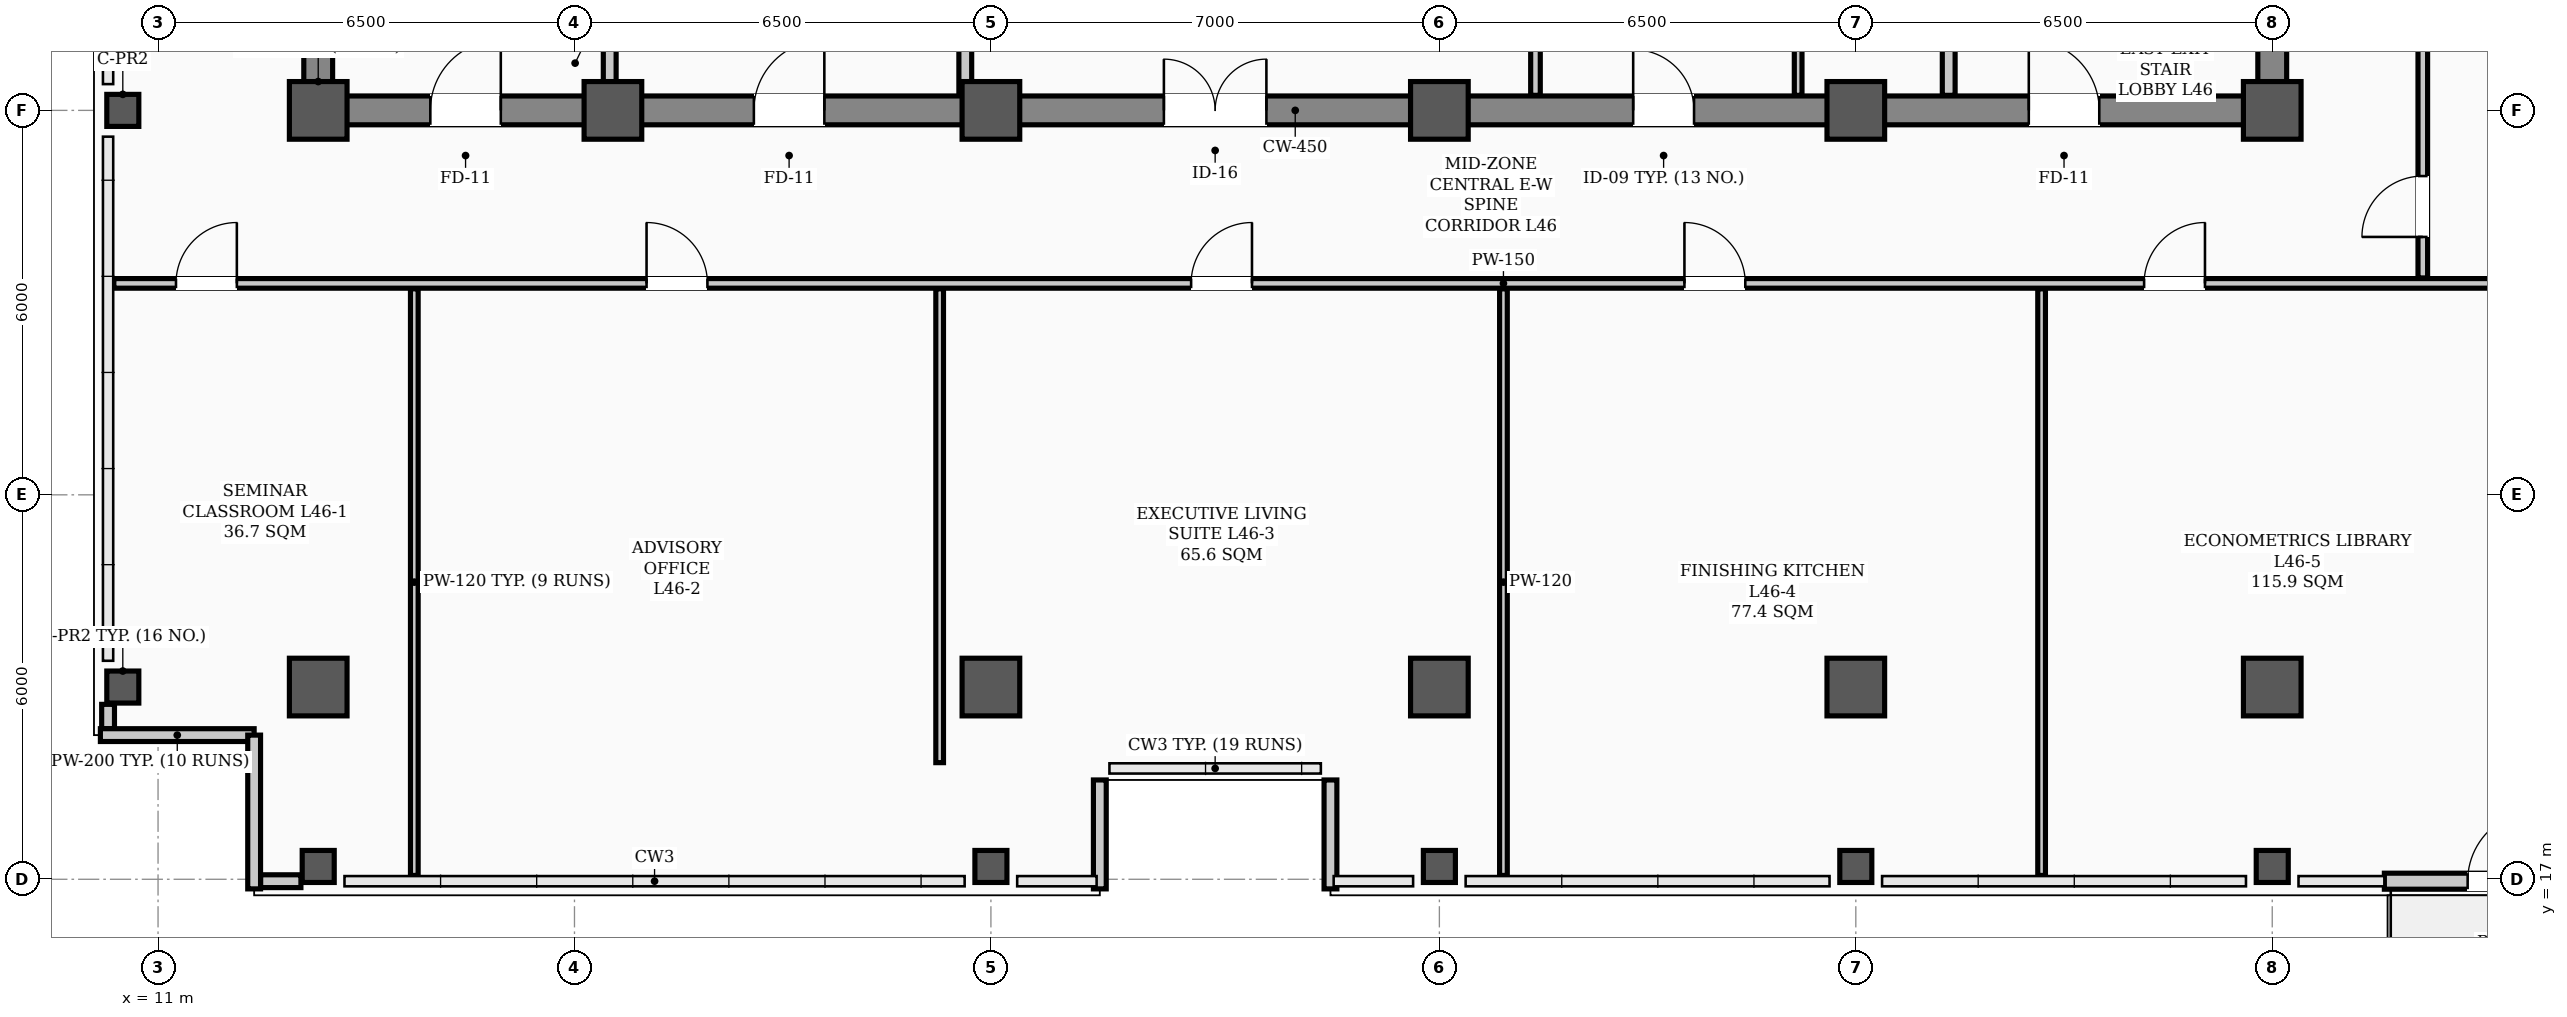
"""IFC4 building model, lengths in metres.
Left out: names, types, materials, properties, quantities, classifications, styles, units other than length and angle.
Written with IfcOpenShell. Run it as: python <this file> out.ifc"""

import sys

from ifc_helpers import new_model, si_unit, direction, frame, frame_2d, origin, origin_2d, place, context, subcontext, project, spatial, rectangle, hollow_rectangle, extrude, element, fill, save


model = new_model("IFC4")
c1 = context("Model", 3, precision=1e-05, world=origin(), true_north=direction((0.0, 1.0)))
c2 = subcontext(c1, "Body", "Model", "MODEL_VIEW")
j1 = project(units=[si_unit("LENGTHUNIT", "METRE"), si_unit("PLANEANGLEUNIT", "RADIAN")], contexts=[c1])
p1 = place(None, origin())
s1 = spatial("IfcSite", under=j1, at=p1, CompositionType="ELEMENT")
p2 = place(p1, origin())
s2 = spatial("IfcBuilding", under=s1, at=p2, CompositionType="ELEMENT")
p3 = place(p2, frame((0.0, 0.0, 185.1)))
s3 = spatial("IfcBuildingStorey", under=s2, at=p3, CompositionType="ELEMENT", Elevation=185.1)
for number, where, z_axis, x_axis in (
    (1, (13.5, 29.0, 0.0), (0.0, 0.0, 1.0), (1.0, 0.0, 0.0)),
    (2, (18.1, 29.0, 0.0), (0.0, 0.0, 1.0), (1.0, 0.0, 0.0)),
    (3, (24.0, 29.0, 0.0), (0.0, 0.0, 1.0), (1.0, 0.0, 0.0)),
    (4, (31.0, 29.0, 0.0), (0.0, 0.0, 1.0), (1.0, 0.0, 0.0)),
    (5, (37.5, 29.0, 0.0), (0.0, 0.0, 1.0), (1.0, 0.0, 0.0)),
    (6, (44.0, 29.0, 0.0), (0.0, 0.0, 1.0), (1.0, 0.0, 0.0)),
    (7, (13.5, 20.0, 0.0), (0.0, 0.0, 1.0), (1.0, 0.0, 0.0)),
    (8, (24.0, 20.0, 0.0), (0.0, 0.0, 1.0), (1.0, 0.0, 0.0)),
    (9, (31.0, 20.0, 0.0), (0.0, 0.0, 1.0), (1.0, 0.0, 0.0)),
    (10, (37.5, 20.0, 0.0), (0.0, 0.0, 1.0), (1.0, 0.0, 0.0)),
    (11, (44.0, 20.0, 0.0), (0.0, 0.0, 1.0), (1.0, 0.0, 0.0)),
):
    element("IfcColumn", number, at=place(p3, frame(where, z_axis=z_axis, x_axis=x_axis)), inside=s3, PredefinedType="COLUMN", context=c2, shape_type="SweptSolid", body=[
        extrude(hollow_rectangle(XDim=0.9, YDim=0.9, WallThickness=0.035, InnerFilletRadius=0.017, OuterFilletRadius=0.052, at=origin_2d()), origin(), (0.0, 0.0, 1.0), 3.9),
    ])
for number, where, z_axis, x_axis in (
    (12, (10.45, 20.0, 0.0), (0.0, 0.0, 1.0), (1.0, 0.0, 0.0)),
    (13, (10.45, 29.0, 0.0), (0.0, 0.0, 1.0), (1.0, 0.0, 0.0)),
    (14, (13.5, 17.2, 0.0), (0.0, 0.0, 1.0), (1.0, 0.0, 0.0)),
    (15, (24.0, 17.2, 0.0), (0.0, 0.0, 1.0), (1.0, 0.0, 0.0)),
    (16, (31.0, 17.2, 0.0), (0.0, 0.0, 1.0), (1.0, 0.0, 0.0)),
    (17, (37.5, 17.2, 0.0), (0.0, 0.0, 1.0), (1.0, 0.0, 0.0)),
    (18, (44.0, 17.2, 0.0), (0.0, 0.0, 1.0), (1.0, 0.0, 0.0)),
):
    element("IfcColumn", number, at=place(p3, frame(where, z_axis=z_axis, x_axis=x_axis)), inside=s3, PredefinedType="COLUMN", context=c2, shape_type="SweptSolid", body=[
        extrude(hollow_rectangle(XDim=0.5, YDim=0.5, WallThickness=0.024, InnerFilletRadius=0.012, OuterFilletRadius=0.036, at=origin_2d()), origin(), (0.0, 0.0, 1.0), 3.9),
    ])
p4 = place(p3, frame((10.22, 19.35, 0.0), z_axis=(0.0, 0.0, 1.0), x_axis=(0.0, 1.0, 0.0)))
e19 = element("IfcWall", 19, at=p4, inside=s3, PredefinedType="PARAPET", context=c2, shape_type="SweptSolid", body=[
    extrude(rectangle(XDim=0.38, YDim=0.2, at=frame_2d((0.19, 0.0))), origin(), (0.0, 0.0, 1.0), 1.2),
])
p5 = place(p3, frame((12.6, 16.97, 0.0), z_axis=(0.0, 0.0, 1.0), x_axis=(1.0, 0.0, 0.0)))
e20 = element("IfcWall", 20, at=p5, inside=s3, PredefinedType="PARAPET", context=c2, shape_type="SweptSolid", body=[
    extrude(rectangle(XDim=0.63, YDim=0.2, at=frame_2d((0.315, 0.0))), origin(), (0.0, 0.0, 1.0), 1.2),
])
for number, where, z_axis, x_axis in (
    (21, (10.1, 19.25, 0.0), (0.0, 0.0, 1.0), (1.0, 0.0, 0.0)),
    (22, (12.5, 19.25, 0.0), (0.0, 0.0, 1.0), (0.0, -1.0, 0.0)),
):
    element("IfcWall", number, at=place(p3, frame(where, z_axis=z_axis, x_axis=x_axis)), inside=s3, PredefinedType="PARAPET", context=c2, shape_type="SweptSolid", body=[
        extrude(rectangle(XDim=2.4, YDim=0.2, at=frame_2d((1.2, 0.0))), origin(), (0.0, 0.0, 1.0), 1.2),
    ])
for number, where, z_axis, x_axis in (
    (23, (25.7, 16.85, 0.0), (0.0, 0.0, 1.0), (0.0, 1.0, 0.0)),
    (24, (29.3, 18.55, 0.0), (0.0, 0.0, 1.0), (0.0, -1.0, 0.0)),
):
    element("IfcWall", number, at=place(p3, frame(where, z_axis=z_axis, x_axis=x_axis)), inside=s3, PredefinedType="PARAPET", context=c2, shape_type="SweptSolid", body=[
        extrude(rectangle(XDim=1.7, YDim=0.2, at=frame_2d((0.85, 0.0))), origin(), (0.0, 0.0, 1.0), 1.2),
    ])
p6 = place(p3, frame((45.75, 16.97, 0.0), z_axis=(0.0, 0.0, 1.0), x_axis=(1.0, 0.0, 0.0)))
e25 = element("IfcWall", 25, at=p6, inside=s3, PredefinedType="STANDARD", context=c2, shape_type="SweptSolid", body=[
    extrude(rectangle(XDim=3.7, YDim=0.25, at=frame_2d((1.85, 0.0))), origin(), (0.0, 0.0, 1.0), 3.18),
])
p7 = place(p6, frame((1.3, 0.0, 0.0)))
e26 = element("IfcOpeningElement", 26, at=p7, cuts=e25, PredefinedType="OPENING", context=c2, shape_type="SweptSolid", body=[
    extrude(rectangle(XDim=1.1, YDim=2.2, at=frame_2d((0.55, 1.1))), frame((0.0, 0.135, 0.0), z_axis=(0.0, -1.0, 0.0), x_axis=(1.0, 0.0, 0.0)), (0.0, 0.0, 1.0), 0.27),
])
p8 = place(p3, frame((13.5, 29.0, 0.0), z_axis=(0.0, 0.0, 1.0), x_axis=(1.0, 0.0, 0.0)))
e27 = element("IfcWall", 27, at=p8, inside=s3, PredefinedType="SHEAR", context=c2, shape_type="SweptSolid", body=[
    extrude(rectangle(XDim=30.5, YDim=0.45, at=frame_2d((15.25, 0.0))), origin(), (0.0, 0.0, 1.0), 3.72),
])
p9 = place(p8, frame((1.75, 0.0, 0.0)))
e28 = element("IfcOpeningElement", 28, at=p9, cuts=e27, PredefinedType="OPENING", context=c2, shape_type="SweptSolid", body=[
    extrude(rectangle(XDim=1.1, YDim=2.08, at=frame_2d((0.55, 1.04))), frame((0.0, 0.235, 0.0), z_axis=(0.0, -1.0, 0.0), x_axis=(1.0, 0.0, 0.0)), (0.0, 0.0, 1.0), 0.47),
])
p10 = place(p8, frame((26.7, 0.0, 0.0)))
e29 = element("IfcOpeningElement", 29, at=p10, cuts=e27, PredefinedType="OPENING", context=c2, shape_type="SweptSolid", body=[
    extrude(rectangle(XDim=1.1, YDim=2.08, at=frame_2d((0.55, 1.04))), frame((0.0, 0.235, 0.0), z_axis=(0.0, -1.0, 0.0), x_axis=(1.0, 0.0, 0.0)), (0.0, 0.0, 1.0), 0.47),
])
p11 = place(p8, frame((6.8, 0.0, 0.0)))
e30 = element("IfcOpeningElement", 30, at=p11, cuts=e27, PredefinedType="OPENING", context=c2, shape_type="SweptSolid", body=[
    extrude(rectangle(XDim=1.1, YDim=2.08, at=frame_2d((0.55, 1.04))), frame((0.0, 0.235, 0.0), z_axis=(0.0, -1.0, 0.0), x_axis=(1.0, 0.0, 0.0)), (0.0, 0.0, 1.0), 0.47),
])
p12 = place(p8, frame((13.2, 0.0, 0.0)))
e31 = element("IfcOpeningElement", 31, at=p12, cuts=e27, PredefinedType="OPENING", context=c2, shape_type="SweptSolid", body=[
    extrude(rectangle(XDim=1.6, YDim=2.08, at=frame_2d((0.8, 1.04))), frame((0.0, 0.235, 0.0), z_axis=(0.0, -1.0, 0.0), x_axis=(1.0, 0.0, 0.0)), (0.0, 0.0, 1.0), 0.47),
])
p13 = place(p8, frame((20.525, 0.0, 0.0)))
e32 = element("IfcOpeningElement", 32, at=p13, cuts=e27, PredefinedType="OPENING", context=c2, shape_type="SweptSolid", body=[
    extrude(rectangle(XDim=0.95, YDim=2.08, at=frame_2d((0.475, 1.04))), frame((0.0, 0.235, 0.0), z_axis=(0.0, -1.0, 0.0), x_axis=(1.0, 0.0, 0.0)), (0.0, 0.0, 1.0), 0.47),
])
for number, where, z_axis, x_axis in (
    (33, (13.5, 29.35, 0.0), (0.0, 0.0, 1.0), (0.0, 1.0, 0.0)),
    (34, (44.0, 29.35, 0.0), (0.0, 0.0, 1.0), (0.0, 1.0, 0.0)),
):
    element("IfcWall", number, at=place(p3, frame(where, z_axis=z_axis, x_axis=x_axis)), inside=s3, PredefinedType="SHEAR", context=c2, shape_type="SweptSolid", body=[
        extrude(rectangle(XDim=8.6, YDim=0.45, at=frame_2d((4.3, 0.0))), origin(), (0.0, 0.0, 1.0), 3.72),
    ])
p14 = place(p3, frame((10.31, 26.3, 0.0), z_axis=(0.0, 0.0, 1.0), x_axis=(1.0, 0.0, 0.0)))
e35 = element("IfcWall", 35, at=p14, inside=s3, PredefinedType="PARTITIONING", context=c2, shape_type="SweptSolid", body=[
    extrude(rectangle(XDim=43.38, YDim=0.15, at=frame_2d((21.69, 0.0))), origin(), (0.0, 0.0, 1.0), 3.2),
])
p15 = place(p14, frame((0.97, 0.0, 0.0)))
e36 = element("IfcOpeningElement", 36, at=p15, cuts=e35, PredefinedType="OPENING", context=c2, shape_type="SweptSolid", body=[
    extrude(rectangle(XDim=0.95, YDim=2.08, at=frame_2d((0.475, 1.04))), frame((0.0, 0.085, 0.0), z_axis=(0.0, -1.0, 0.0), x_axis=(1.0, 0.0, 0.0)), (0.0, 0.0, 1.0), 0.17),
])
p16 = place(p14, frame((8.315, 0.0, 0.0)))
e37 = element("IfcOpeningElement", 37, at=p16, cuts=e35, PredefinedType="OPENING", context=c2, shape_type="SweptSolid", body=[
    extrude(rectangle(XDim=0.95, YDim=2.08, at=frame_2d((0.475, 1.04))), frame((0.0, 0.085, 0.0), z_axis=(0.0, -1.0, 0.0), x_axis=(1.0, 0.0, 0.0)), (0.0, 0.0, 1.0), 0.17),
])
p17 = place(p14, frame((16.815, 0.0, 0.0)))
e38 = element("IfcOpeningElement", 38, at=p17, cuts=e35, PredefinedType="OPENING", context=c2, shape_type="SweptSolid", body=[
    extrude(rectangle(XDim=0.95, YDim=2.08, at=frame_2d((0.475, 1.04))), frame((0.0, 0.085, 0.0), z_axis=(0.0, -1.0, 0.0), x_axis=(1.0, 0.0, 0.0)), (0.0, 0.0, 1.0), 0.17),
])
p18 = place(p14, frame((24.515, 0.0, 0.0)))
e39 = element("IfcOpeningElement", 39, at=p18, cuts=e35, PredefinedType="OPENING", context=c2, shape_type="SweptSolid", body=[
    extrude(rectangle(XDim=0.95, YDim=2.08, at=frame_2d((0.475, 1.04))), frame((0.0, 0.085, 0.0), z_axis=(0.0, -1.0, 0.0), x_axis=(1.0, 0.0, 0.0)), (0.0, 0.0, 1.0), 0.17),
])
p19 = place(p14, frame((31.69, 0.0, 0.0)))
e40 = element("IfcOpeningElement", 40, at=p19, cuts=e35, PredefinedType="OPENING", context=c2, shape_type="SweptSolid", body=[
    extrude(rectangle(XDim=0.95, YDim=2.08, at=frame_2d((0.475, 1.04))), frame((0.0, 0.085, 0.0), z_axis=(0.0, -1.0, 0.0), x_axis=(1.0, 0.0, 0.0)), (0.0, 0.0, 1.0), 0.17),
])
for number, where, z_axis, x_axis in (
    (41, (18.05, 29.235, 0.0), (0.0, 0.0, 1.0), (0.0, 1.0, 0.0)),
    (42, (38.95, 29.235, 0.0), (0.0, 0.0, 1.0), (0.0, 1.0, 0.0)),
):
    element("IfcWall", number, at=place(p3, frame(where, z_axis=z_axis, x_axis=x_axis)), inside=s3, PredefinedType="STANDARD", context=c2, shape_type="SweptSolid", body=[
        extrude(rectangle(XDim=1.065, YDim=0.2, at=frame_2d((0.532, 0.0))), origin(), (0.0, 0.0, 1.0), 3.35),
    ])
p20 = place(p3, frame((23.6, 29.235, 0.0), z_axis=(0.0, 0.0, 1.0), x_axis=(0.0, 1.0, 0.0)))
e43 = element("IfcWall", 43, at=p20, inside=s3, PredefinedType="STANDARD", context=c2, shape_type="SweptSolid", body=[
    extrude(rectangle(XDim=5.465, YDim=0.2, at=frame_2d((2.732, 0.0))), origin(), (0.0, 0.0, 1.0), 3.2),
])
p21 = place(p3, frame((32.5, 29.235, 0.0), z_axis=(0.0, 0.0, 1.0), x_axis=(0.0, 1.0, 0.0)))
e44 = element("IfcWall", 44, at=p21, inside=s3, PredefinedType="PARTITIONING", context=c2, shape_type="SweptSolid", body=[
    extrude(rectangle(XDim=2.53, YDim=0.15, at=frame_2d((1.265, 0.0))), origin(), (0.0, 0.0, 1.0), 3.35),
])
p22 = place(p3, frame((36.6, 29.235, 0.0), z_axis=(0.0, 0.0, 1.0), x_axis=(0.0, 1.0, 0.0)))
e45 = element("IfcWall", 45, at=p22, inside=s3, PredefinedType="PARTITIONING", context=c2, shape_type="SweptSolid", body=[
    extrude(rectangle(XDim=2.53, YDim=0.12, at=frame_2d((1.265, 0.0))), origin(), (0.0, 0.0, 1.0), 3.35),
])
p23 = place(p3, frame((46.35, 26.385, 0.0), z_axis=(0.0, 0.0, 1.0), x_axis=(0.0, 1.0, 0.0)))
e46 = element("IfcWall", 46, at=p23, inside=s3, PredefinedType="PARTITIONING", context=c2, shape_type="SweptSolid", body=[
    extrude(rectangle(XDim=13.58, YDim=0.15, at=frame_2d((6.79, 0.0))), origin(), (0.0, 0.0, 1.0), 3.1),
])
p24 = place(p23, frame((0.64, 0.0, 0.0)))
e47 = element("IfcOpeningElement", 47, at=p24, cuts=e46, PredefinedType="OPENING", context=c2, shape_type="SweptSolid", body=[
    extrude(rectangle(XDim=0.95, YDim=2.08, at=frame_2d((0.475, 1.04))), frame((0.0, 0.085, 0.0), z_axis=(0.0, -1.0, 0.0), x_axis=(1.0, 0.0, 0.0)), (0.0, 0.0, 1.0), 0.17),
])
p25 = place(p23, frame((9.665, 0.0, 0.0)))
e48 = element("IfcOpeningElement", 48, at=p25, cuts=e46, PredefinedType="OPENING", context=c2, shape_type="SweptSolid", body=[
    extrude(rectangle(XDim=0.95, YDim=2.08, at=frame_2d((0.475, 1.04))), frame((0.0, 0.085, 0.0), z_axis=(0.0, -1.0, 0.0), x_axis=(1.0, 0.0, 0.0)), (0.0, 0.0, 1.0), 0.17),
])
p26 = place(p3, frame((15.0, 17.06, 0.0), z_axis=(0.0, 0.0, 1.0), x_axis=(0.0, 1.0, 0.0)))
e49 = element("IfcWall", 49, at=p26, inside=s3, PredefinedType="PARTITIONING", context=c2, shape_type="SweptSolid", body=[
    extrude(rectangle(XDim=9.155, YDim=0.12, at=frame_2d((4.578, 0.0))), origin(), (0.0, 0.0, 1.0), 3.1),
])
p27 = place(p3, frame((23.2, 18.82, 0.0), z_axis=(0.0, 0.0, 1.0), x_axis=(0.0, 1.0, 0.0)))
e50 = element("IfcWall", 50, at=p27, inside=s3, PredefinedType="PARTITIONING", context=c2, shape_type="SweptSolid", body=[
    extrude(rectangle(XDim=7.395, YDim=0.12, at=frame_2d((3.698, 0.0))), origin(), (0.0, 0.0, 1.0), 3.1),
])
for number, where, z_axis, x_axis in (
    (51, (32.0, 17.06, 0.0), (0.0, 0.0, 1.0), (0.0, 1.0, 0.0)),
    (52, (40.4, 17.06, 0.0), (0.0, 0.0, 1.0), (0.0, 1.0, 0.0)),
):
    element("IfcWall", number, at=place(p3, frame(where, z_axis=z_axis, x_axis=x_axis)), inside=s3, PredefinedType="PARTITIONING", context=c2, shape_type="SweptSolid", body=[
        extrude(rectangle(XDim=9.155, YDim=0.12, at=frame_2d((4.578, 0.0))), origin(), (0.0, 0.0, 1.0), 3.1),
    ])
p28 = place(p7, origin())
e53 = element("IfcDoor", 53, at=p28, inside=s3, OperationType="SINGLE_SWING_RIGHT", PredefinedType="DOOR", context=c2, shape_type="SweptSolid", body=[
    extrude(rectangle(XDim=1.1, YDim=2.2, at=frame_2d((0.55, 1.1))), frame((0.0, 0.025, 0.0), z_axis=(0.0, -1.0, 0.0), x_axis=(1.0, 0.0, 0.0)), (0.0, 0.0, 1.0), 0.05),
])
fill(e26, e53)
p29 = place(p9, origin())
e54 = element("IfcDoor", 54, at=p29, inside=s3, OperationType="SINGLE_SWING_RIGHT", PredefinedType="DOOR", context=c2, shape_type="SweptSolid", body=[
    extrude(rectangle(XDim=1.1, YDim=2.08, at=frame_2d((0.55, 1.04))), frame((0.0, 0.025, 0.0), z_axis=(0.0, -1.0, 0.0), x_axis=(1.0, 0.0, 0.0)), (0.0, 0.0, 1.0), 0.05),
])
fill(e28, e54)
p30 = place(p10, origin())
e55 = element("IfcDoor", 55, at=p30, inside=s3, OperationType="SINGLE_SWING_LEFT", PredefinedType="DOOR", context=c2, shape_type="SweptSolid", body=[
    extrude(rectangle(XDim=1.1, YDim=2.08, at=frame_2d((0.55, 1.04))), frame((0.0, 0.025, 0.0), z_axis=(0.0, -1.0, 0.0), x_axis=(1.0, 0.0, 0.0)), (0.0, 0.0, 1.0), 0.05),
])
fill(e29, e55)
p31 = place(p11, origin())
e56 = element("IfcDoor", 56, at=p31, inside=s3, OperationType="SINGLE_SWING_RIGHT", PredefinedType="DOOR", context=c2, shape_type="SweptSolid", body=[
    extrude(rectangle(XDim=1.1, YDim=2.08, at=frame_2d((0.55, 1.04))), frame((0.0, 0.025, 0.0), z_axis=(0.0, -1.0, 0.0), x_axis=(1.0, 0.0, 0.0)), (0.0, 0.0, 1.0), 0.05),
])
fill(e30, e56)
p32 = place(p12, origin())
e57 = element("IfcDoor", 57, at=p32, inside=s3, OperationType="DOUBLE_DOOR_SINGLE_SWING", PredefinedType="DOOR", context=c2, shape_type="SweptSolid", body=[
    extrude(rectangle(XDim=1.6, YDim=2.08, at=frame_2d((0.8, 1.04))), frame((0.0, 0.025, 0.0), z_axis=(0.0, -1.0, 0.0), x_axis=(1.0, 0.0, 0.0)), (0.0, 0.0, 1.0), 0.05),
])
fill(e31, e57)
p33 = place(p13, origin())
e58 = element("IfcDoor", 58, at=p33, inside=s3, OperationType="SINGLE_SWING_LEFT", PredefinedType="DOOR", context=c2, shape_type="SweptSolid", body=[
    extrude(rectangle(XDim=0.95, YDim=2.08, at=frame_2d((0.475, 1.04))), frame((0.0, 0.025, 0.0), z_axis=(0.0, -1.0, 0.0), x_axis=(1.0, 0.0, 0.0)), (0.0, 0.0, 1.0), 0.05),
])
fill(e32, e58)
p34 = place(p15, origin())
e59 = element("IfcDoor", 59, at=p34, inside=s3, OperationType="SINGLE_SWING_RIGHT", PredefinedType="DOOR", context=c2, shape_type="SweptSolid", body=[
    extrude(rectangle(XDim=0.95, YDim=2.08, at=frame_2d((0.475, 1.04))), frame((0.0, 0.025, 0.0), z_axis=(0.0, -1.0, 0.0), x_axis=(1.0, 0.0, 0.0)), (0.0, 0.0, 1.0), 0.05),
])
fill(e36, e59)
p35 = place(p16, origin())
e60 = element("IfcDoor", 60, at=p35, inside=s3, OperationType="SINGLE_SWING_LEFT", PredefinedType="DOOR", context=c2, shape_type="SweptSolid", body=[
    extrude(rectangle(XDim=0.95, YDim=2.08, at=frame_2d((0.475, 1.04))), frame((0.0, 0.025, 0.0), z_axis=(0.0, -1.0, 0.0), x_axis=(1.0, 0.0, 0.0)), (0.0, 0.0, 1.0), 0.05),
])
fill(e37, e60)
p36 = place(p17, origin())
e61 = element("IfcDoor", 61, at=p36, inside=s3, OperationType="SINGLE_SWING_RIGHT", PredefinedType="DOOR", context=c2, shape_type="SweptSolid", body=[
    extrude(rectangle(XDim=0.95, YDim=2.08, at=frame_2d((0.475, 1.04))), frame((0.0, 0.025, 0.0), z_axis=(0.0, -1.0, 0.0), x_axis=(1.0, 0.0, 0.0)), (0.0, 0.0, 1.0), 0.05),
])
fill(e38, e61)
p37 = place(p18, origin())
e62 = element("IfcDoor", 62, at=p37, inside=s3, OperationType="SINGLE_SWING_LEFT", PredefinedType="DOOR", context=c2, shape_type="SweptSolid", body=[
    extrude(rectangle(XDim=0.95, YDim=2.08, at=frame_2d((0.475, 1.04))), frame((0.0, 0.025, 0.0), z_axis=(0.0, -1.0, 0.0), x_axis=(1.0, 0.0, 0.0)), (0.0, 0.0, 1.0), 0.05),
])
fill(e39, e62)
p38 = place(p19, origin())
e63 = element("IfcDoor", 63, at=p38, inside=s3, OperationType="SINGLE_SWING_RIGHT", PredefinedType="DOOR", context=c2, shape_type="SweptSolid", body=[
    extrude(rectangle(XDim=0.95, YDim=2.08, at=frame_2d((0.475, 1.04))), frame((0.0, 0.025, 0.0), z_axis=(0.0, -1.0, 0.0), x_axis=(1.0, 0.0, 0.0)), (0.0, 0.0, 1.0), 0.05),
])
fill(e40, e63)
p39 = place(p24, origin())
e64 = element("IfcDoor", 64, at=p39, inside=s3, OperationType="SINGLE_SWING_LEFT", PredefinedType="DOOR", context=c2, shape_type="SweptSolid", body=[
    extrude(rectangle(XDim=0.95, YDim=2.08, at=frame_2d((0.475, 1.04))), frame((0.0, 0.025, 0.0), z_axis=(0.0, -1.0, 0.0), x_axis=(1.0, 0.0, 0.0)), (0.0, 0.0, 1.0), 0.05),
])
fill(e47, e64)
save(model, sys.argv[1])
